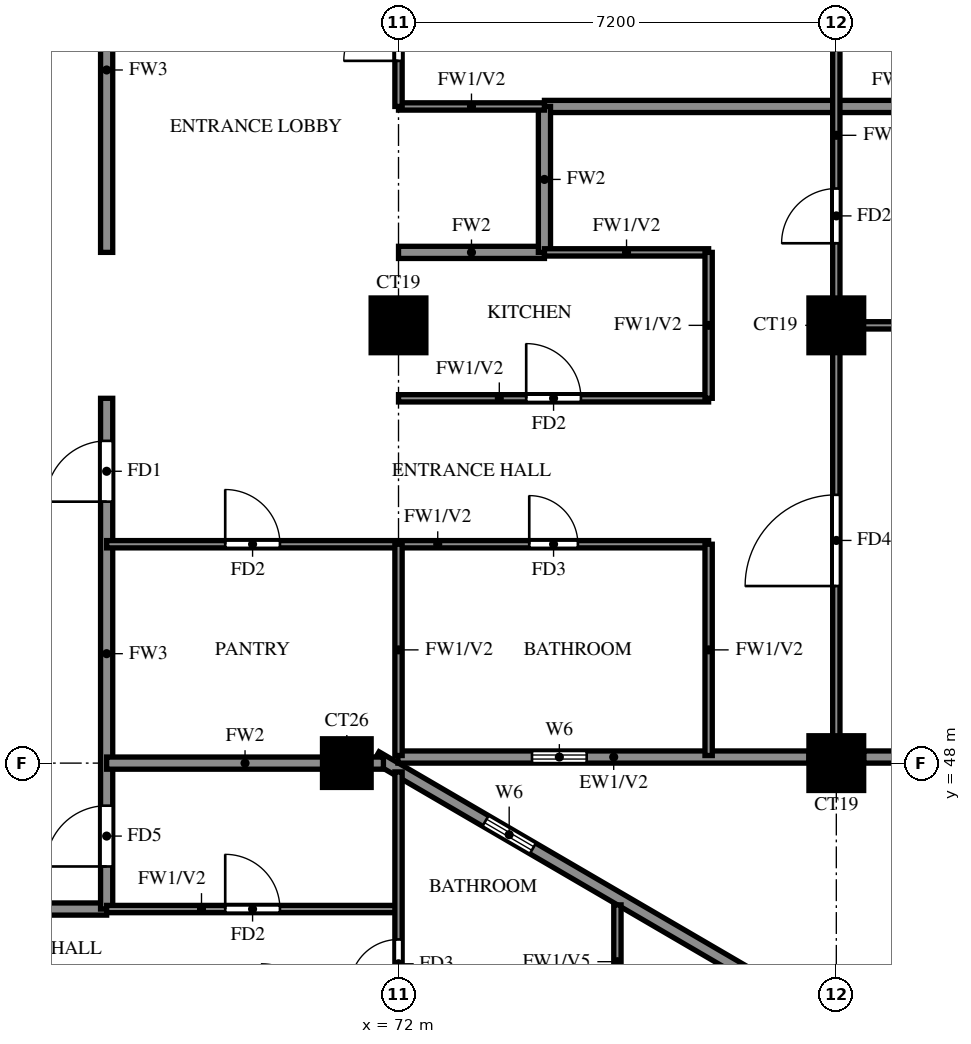
"""IFC4 building model, lengths in metres.
Left out: names, types, materials, properties, quantities, classifications, styles, units other than length and angle.
Written with IfcOpenShell. Run it as: python <this file> out.ifc"""

import sys

from ifc_helpers import new_model, si_unit, direction, frame, frame_2d, origin, origin_2d, place, context, subcontext, project, spatial, rectangle, extrude, source, transform, mapped, element, fill, save


model = new_model("IFC4")
c1 = context("Model", 3, precision=1e-05, world=origin(), true_north=direction((0.0, 1.0)))
c2 = subcontext(c1, "Body", "Model", "MODEL_VIEW")
j1 = project(units=[si_unit("LENGTHUNIT", "METRE"), si_unit("PLANEANGLEUNIT", "RADIAN")], contexts=[c1])
p1 = place(None, origin())
s1 = spatial("IfcSite", under=j1, at=p1, CompositionType="ELEMENT")
p2 = place(p1, origin())
s2 = spatial("IfcBuilding", under=s1, at=p2, CompositionType="ELEMENT")
p3 = place(p2, frame((0.0, 0.0, 181.5)))
s3 = spatial("IfcBuildingStorey", under=s2, at=p3, CompositionType="ELEMENT", Elevation=181.5)
m1 = source(origin(), c2, "Body", "SweptSolid", [
    extrude(rectangle(XDim=0.8, YDim=0.8, at=origin_2d()), origin(), (0.0, 0.0, 1.0), 3.2),
])
p4 = place(p3, frame((71.15, 48.0, 0.0), z_axis=(0.0, 0.0, 1.0), x_axis=(1.0, 0.0, 0.0)))
e1 = element("IfcColumn", 1, at=p4, inside=s3, PredefinedType="COLUMN", context=c2, shape_type="MappedRepresentation", body=[
    mapped(m1, transform((0.0, 0.0, 0.0))),
])
m2 = source(origin(), c2, "Body", "SweptSolid", [
    extrude(rectangle(XDim=0.9, YDim=0.9, at=origin_2d()), origin(), (0.0, 0.0, 1.0), 3.2),
])
for number, where, z_axis, x_axis in (
    (2, (79.2, 48.0, 0.0), (0.0, 0.0, 1.0), (1.0, 0.0, 0.0)),
    (3, (72.0, 55.2, 0.0), (0.0, 0.0, 1.0), (1.0, 0.0, 0.0)),
    (4, (79.2, 55.2, 0.0), (0.0, 0.0, 1.0), (1.0, 0.0, 0.0)),
):
    element("IfcColumn", number, at=place(p3, frame(where, z_axis=z_axis, x_axis=x_axis)), inside=s3, PredefinedType="COLUMN", context=c2, shape_type="MappedRepresentation", body=[
        mapped(m2, transform((0.0, 0.0, 0.0))),
    ])
p5 = place(p3, frame((85.719, 39.881, 0.0), z_axis=(0.0, 0.0, 1.0), x_axis=(-0.86377618652, 0.503875678716, 0.0)))
e5 = element("IfcWall", 5, at=p5, inside=s3, PredefinedType="SOLIDWALL", context=c2, shape_type="SweptSolid", body=[
    extrude(rectangle(XDim=16.311, YDim=0.2, at=frame_2d((8.156, 0.0))), origin(), (0.0, 0.0, 1.0), 3.2),
])
p6 = place(p5, frame((13.326, 0.0, 1.5)))
e6 = element("IfcOpeningElement", 6, at=p6, cuts=e5, PredefinedType="OPENING", context=c2, shape_type="SweptSolid", body=[
    extrude(rectangle(XDim=0.9, YDim=0.9, at=frame_2d((0.45, 0.45))), frame((0.0, 0.11, 0.0), z_axis=(0.0, -1.0, 0.0), x_axis=(1.0, 0.0, 0.0)), (0.0, 0.0, 1.0), 0.22),
])
p7 = place(p3, frame((71.99, 48.1, 0.0), z_axis=(0.0, 0.0, 1.0), x_axis=(1.0, 0.0, 0.0)))
e7 = element("IfcWall", 7, at=p7, inside=s3, PredefinedType="SOLIDWALL", context=c2, shape_type="SweptSolid", body=[
    extrude(rectangle(XDim=6.76, YDim=0.2, at=frame_2d((3.38, 0.0))), origin(), (0.0, 0.0, 1.0), 3.2),
])
p8 = place(p7, frame((2.205, 0.0, 1.5)))
e8 = element("IfcOpeningElement", 8, at=p8, cuts=e7, PredefinedType="OPENING", context=c2, shape_type="SweptSolid", body=[
    extrude(rectangle(XDim=0.9, YDim=0.9, at=frame_2d((0.45, 0.45))), frame((0.0, 0.11, 0.0), z_axis=(0.0, -1.0, 0.0), x_axis=(1.0, 0.0, 0.0)), (0.0, 0.0, 1.0), 0.22),
])
p9 = place(p3, frame((79.65, 48.1, 0.0), z_axis=(0.0, 0.0, 1.0), x_axis=(1.0, 0.0, 0.0)))
e9 = element("IfcWall", 9, at=p9, inside=s3, PredefinedType="SOLIDWALL", context=c2, shape_type="SweptSolid", body=[
    extrude(rectangle(XDim=5.75, YDim=0.2, at=frame_2d((2.875, 0.0))), origin(), (0.0, 0.0, 1.0), 3.2),
])
p10 = place(p9, frame((1.675, 0.0, 0.6)))
e10 = element("IfcOpeningElement", 10, at=p10, cuts=e9, PredefinedType="OPENING", context=c2, shape_type="SweptSolid", body=[
    extrude(rectangle(XDim=2.4, YDim=2.4, at=frame_2d((1.2, 1.2))), frame((0.0, 0.11, 0.0), z_axis=(0.0, -1.0, 0.0), x_axis=(1.0, 0.0, 0.0)), (0.0, 0.0, 1.0), 0.22),
])
p11 = place(p3, frame((60.0, 45.6, 0.0), z_axis=(0.0, 0.0, 1.0), x_axis=(1.0, 0.0, 0.0)))
e11 = element("IfcWall", 11, at=p11, inside=s3, PredefinedType="SOLIDWALL", context=c2, shape_type="SweptSolid", body=[
    extrude(rectangle(XDim=7.2, YDim=0.2, at=frame_2d((3.6, 0.0))), origin(), (0.0, 0.0, 1.0), 3.2),
])
p12 = place(p3, frame((67.2, 45.6, 0.0), z_axis=(0.0, 0.0, 1.0), x_axis=(0.0, 1.0, 0.0)))
e12 = element("IfcWall", 12, at=p12, inside=s3, PredefinedType="SOLIDWALL", context=c2, shape_type="SweptSolid", body=[
    extrude(rectangle(XDim=8.4, YDim=0.2, at=frame_2d((4.2, 0.0))), origin(), (0.0, 0.0, 1.0), 3.2),
])
p13 = place(p12, frame((6.7, 0.0, 0.0)))
e13 = element("IfcOpeningElement", 13, at=p13, cuts=e12, PredefinedType="OPENING", context=c2, shape_type="SweptSolid", body=[
    extrude(rectangle(XDim=1.0, YDim=2.1, at=frame_2d((0.5, 1.05))), frame((0.0, 0.11, 0.0), z_axis=(0.0, -1.0, 0.0), x_axis=(1.0, 0.0, 0.0)), (0.0, 0.0, 1.0), 0.22),
])
p14 = place(p12, frame((0.7, 0.0, 0.0)))
e14 = element("IfcOpeningElement", 14, at=p14, cuts=e12, PredefinedType="OPENING", context=c2, shape_type="SweptSolid", body=[
    extrude(rectangle(XDim=1.0, YDim=2.1, at=frame_2d((0.5, 1.05))), frame((0.0, 0.11, 0.0), z_axis=(0.0, -1.0, 0.0), x_axis=(1.0, 0.0, 0.0)), (0.0, 0.0, 1.0), 0.22),
])
p15 = place(p3, frame((67.2, 56.4, 0.0), z_axis=(0.0, 0.0, 1.0), x_axis=(0.0, 1.0, 0.0)))
e15 = element("IfcWall", 15, at=p15, inside=s3, PredefinedType="SOLIDWALL", context=c2, shape_type="SweptSolid", body=[
    extrude(rectangle(XDim=6.0, YDim=0.2, at=frame_2d((3.0, 0.0))), origin(), (0.0, 0.0, 1.0), 3.2),
])
p16 = place(p15, frame((3.7, 0.0, 0.0)))
e16 = element("IfcOpeningElement", 16, at=p16, cuts=e15, PredefinedType="OPENING", context=c2, shape_type="SweptSolid", body=[
    extrude(rectangle(XDim=1.0, YDim=2.1, at=frame_2d((0.5, 1.05))), frame((0.0, 0.11, 0.0), z_axis=(0.0, -1.0, 0.0), x_axis=(1.0, 0.0, 0.0)), (0.0, 0.0, 1.0), 0.22),
])
p17 = place(p3, frame((67.2, 48.0, 0.0), z_axis=(0.0, 0.0, 1.0), x_axis=(1.0, 0.0, 0.0)))
e17 = element("IfcWall", 17, at=p17, inside=s3, PredefinedType="SOLIDWALL", context=c2, shape_type="SweptSolid", body=[
    extrude(rectangle(XDim=4.552, YDim=0.2, at=frame_2d((2.276, 0.0))), origin(), (0.0, 0.0, 1.0), 3.2),
])
p18 = place(p3, frame((72.0, 56.4, 0.0), z_axis=(0.0, 0.0, 1.0), x_axis=(1.0, 0.0, 0.0)))
e18 = element("IfcWall", 18, at=p18, inside=s3, PredefinedType="SOLIDWALL", context=c2, shape_type="SweptSolid", body=[
    extrude(rectangle(XDim=2.4, YDim=0.2, at=frame_2d((1.2, 0.0))), origin(), (0.0, 0.0, 1.0), 3.2),
])
p19 = place(p3, frame((74.4, 58.8, 0.0), z_axis=(0.0, 0.0, 1.0), x_axis=(1.0, 0.0, 0.0)))
e19 = element("IfcWall", 19, at=p19, inside=s3, PredefinedType="SOLIDWALL", context=c2, shape_type="SweptSolid", body=[
    extrude(rectangle(XDim=11.875, YDim=0.2, at=frame_2d((5.938, 0.0))), origin(), (0.0, 0.0, 1.0), 2.3),
])
p20 = place(p3, frame((74.4, 56.4, 0.0), z_axis=(0.0, 0.0, 1.0), x_axis=(0.0, 1.0, 0.0)))
e20 = element("IfcWall", 20, at=p20, inside=s3, PredefinedType="SOLIDWALL", context=c2, shape_type="SweptSolid", body=[
    extrude(rectangle(XDim=2.4, YDim=0.2, at=frame_2d((1.2, 0.0))), origin(), (0.0, 0.0, 1.0), 3.2),
])
p21 = place(p3, frame((67.2, 45.6, 0.0), z_axis=(0.0, 0.0, 1.0), x_axis=(1.0, 0.0, 0.0)))
e21 = element("IfcWall", 21, at=p21, inside=s3, PredefinedType="PARTITIONING", context=c2, shape_type="SweptSolid", body=[
    extrude(rectangle(XDim=4.8, YDim=0.12, at=frame_2d((2.4, 0.0))), origin(), (0.0, 0.0, 1.0), 3.2),
])
p22 = place(p21, frame((1.95, 0.0, 0.0)))
e22 = element("IfcOpeningElement", 22, at=p22, cuts=e21, PredefinedType="OPENING", context=c2, shape_type="SweptSolid", body=[
    extrude(rectangle(XDim=0.9, YDim=2.1, at=frame_2d((0.45, 1.05))), frame((0.0, 0.07, 0.0), z_axis=(0.0, -1.0, 0.0), x_axis=(1.0, 0.0, 0.0)), (0.0, 0.0, 1.0), 0.14),
])
p23 = place(p3, frame((67.2, 51.6, 0.0), z_axis=(0.0, 0.0, 1.0), x_axis=(1.0, 0.0, 0.0)))
e23 = element("IfcWall", 23, at=p23, inside=s3, PredefinedType="PARTITIONING", context=c2, shape_type="SweptSolid", body=[
    extrude(rectangle(XDim=9.9, YDim=0.12, at=frame_2d((4.95, 0.0))), origin(), (0.0, 0.0, 1.0), 3.2),
])
p24 = place(p23, frame((6.95, 0.0, 0.0)))
e24 = element("IfcOpeningElement", 24, at=p24, cuts=e23, PredefinedType="OPENING", context=c2, shape_type="SweptSolid", body=[
    extrude(rectangle(XDim=0.8, YDim=2.1, at=frame_2d((0.4, 1.05))), frame((0.0, 0.07, 0.0), z_axis=(0.0, -1.0, 0.0), x_axis=(1.0, 0.0, 0.0)), (0.0, 0.0, 1.0), 0.14),
])
p25 = place(p23, frame((1.95, 0.0, 0.0)))
e25 = element("IfcOpeningElement", 25, at=p25, cuts=e23, PredefinedType="OPENING", context=c2, shape_type="SweptSolid", body=[
    extrude(rectangle(XDim=0.9, YDim=2.1, at=frame_2d((0.45, 1.05))), frame((0.0, 0.07, 0.0), z_axis=(0.0, -1.0, 0.0), x_axis=(1.0, 0.0, 0.0)), (0.0, 0.0, 1.0), 0.14),
])
p26 = place(p3, frame((72.0, 54.0, 0.0), z_axis=(0.0, 0.0, 1.0), x_axis=(1.0, 0.0, 0.0)))
e26 = element("IfcWall", 26, at=p26, inside=s3, PredefinedType="PARTITIONING", context=c2, shape_type="SweptSolid", body=[
    extrude(rectangle(XDim=5.1, YDim=0.12, at=frame_2d((2.55, 0.0))), origin(), (0.0, 0.0, 1.0), 3.2),
])
p27 = place(p26, frame((2.1, 0.0, 0.0)))
e27 = element("IfcOpeningElement", 27, at=p27, cuts=e26, PredefinedType="OPENING", context=c2, shape_type="SweptSolid", body=[
    extrude(rectangle(XDim=0.9, YDim=2.1, at=frame_2d((0.45, 1.05))), frame((0.0, 0.07, 0.0), z_axis=(0.0, -1.0, 0.0), x_axis=(1.0, 0.0, 0.0)), (0.0, 0.0, 1.0), 0.14),
])
p28 = place(p3, frame((79.2, 55.2, 0.0), z_axis=(0.0, 0.0, 1.0), x_axis=(1.0, 0.0, 0.0)))
e28 = element("IfcWall", 28, at=p28, inside=s3, PredefinedType="PARTITIONING", context=c2, shape_type="SweptSolid", body=[
    extrude(rectangle(XDim=7.075, YDim=0.12, at=frame_2d((3.538, 0.0))), origin(), (0.0, 0.0, 1.0), 3.2),
])
p29 = place(p3, frame((74.4, 56.4, 0.0), z_axis=(0.0, 0.0, 1.0), x_axis=(1.0, 0.0, 0.0)))
e29 = element("IfcWall", 29, at=p29, inside=s3, PredefinedType="PARTITIONING", context=c2, shape_type="SweptSolid", body=[
    extrude(rectangle(XDim=2.7, YDim=0.12, at=frame_2d((1.35, 0.0))), origin(), (0.0, 0.0, 1.0), 3.2),
])
p30 = place(p3, frame((72.0, 58.8, 0.0), z_axis=(0.0, 0.0, 1.0), x_axis=(1.0, 0.0, 0.0)))
e30 = element("IfcWall", 30, at=p30, inside=s3, PredefinedType="PARTITIONING", context=c2, shape_type="SweptSolid", body=[
    extrude(rectangle(XDim=2.4, YDim=0.12, at=frame_2d((1.2, 0.0))), origin(), (0.0, 0.0, 1.0), 3.2),
])
p31 = place(p3, frame((72.0, 39.725, 0.0), z_axis=(0.0, 0.0, 1.0), x_axis=(0.0, 1.0, 0.0)))
e31 = element("IfcWall", 31, at=p31, inside=s3, PredefinedType="PARTITIONING", context=c2, shape_type="SweptSolid", body=[
    extrude(rectangle(XDim=8.13, YDim=0.12, at=frame_2d((4.065, 0.0))), origin(), (0.0, 0.0, 1.0), 2.3),
])
p32 = place(p31, frame((1.788, 0.0, 0.0)))
e32 = element("IfcOpeningElement", 32, at=p32, cuts=e31, PredefinedType="OPENING", context=c2, shape_type="SweptSolid", body=[
    extrude(rectangle(XDim=0.9, YDim=2.1, at=frame_2d((0.45, 1.05))), frame((0.0, 0.07, 0.0), z_axis=(0.0, -1.0, 0.0), x_axis=(1.0, 0.0, 0.0)), (0.0, 0.0, 1.0), 0.14),
])
p33 = place(p31, frame((4.575, 0.0, 0.0)))
e33 = element("IfcOpeningElement", 33, at=p33, cuts=e31, PredefinedType="OPENING", context=c2, shape_type="SweptSolid", body=[
    extrude(rectangle(XDim=0.8, YDim=2.1, at=frame_2d((0.4, 1.05))), frame((0.0, 0.07, 0.0), z_axis=(0.0, -1.0, 0.0), x_axis=(1.0, 0.0, 0.0)), (0.0, 0.0, 1.0), 0.14),
])
p34 = place(p3, frame((72.0, 48.125, 0.0), z_axis=(0.0, 0.0, 1.0), x_axis=(0.0, 1.0, 0.0)))
e34 = element("IfcWall", 34, at=p34, inside=s3, PredefinedType="PARTITIONING", context=c2, shape_type="SweptSolid", body=[
    extrude(rectangle(XDim=3.475, YDim=0.12, at=frame_2d((1.738, 0.0))), origin(), (0.0, 0.0, 1.0), 3.2),
])
p35 = place(p3, frame((72.0, 58.8, 0.0), z_axis=(0.0, 0.0, 1.0), x_axis=(0.0, 1.0, 0.0)))
e35 = element("IfcWall", 35, at=p35, inside=s3, PredefinedType="PARTITIONING", context=c2, shape_type="SweptSolid", body=[
    extrude(rectangle(XDim=3.6, YDim=0.12, at=frame_2d((1.8, 0.0))), origin(), (0.0, 0.0, 1.0), 3.2),
])
p36 = place(p35, frame((0.75, 0.0, 0.0)))
e36 = element("IfcOpeningElement", 36, at=p36, cuts=e35, PredefinedType="OPENING", context=c2, shape_type="SweptSolid", body=[
    extrude(rectangle(XDim=0.9, YDim=2.1, at=frame_2d((0.45, 1.05))), frame((0.0, 0.07, 0.0), z_axis=(0.0, -1.0, 0.0), x_axis=(1.0, 0.0, 0.0)), (0.0, 0.0, 1.0), 0.14),
])
p37 = place(p3, frame((75.6, 43.8, 0.0), z_axis=(0.0, 0.0, 1.0), x_axis=(0.0, 1.0, 0.0)))
e37 = element("IfcWall", 37, at=p37, inside=s3, PredefinedType="PARTITIONING", context=c2, shape_type="SweptSolid", body=[
    extrude(rectangle(XDim=1.868, YDim=0.12, at=frame_2d((0.934, 0.0))), origin(), (0.0, 0.0, 1.0), 2.3),
])
p38 = place(p3, frame((77.1, 48.125, 0.0), z_axis=(0.0, 0.0, 1.0), x_axis=(0.0, 1.0, 0.0)))
e38 = element("IfcWall", 38, at=p38, inside=s3, PredefinedType="PARTITIONING", context=c2, shape_type="SweptSolid", body=[
    extrude(rectangle(XDim=3.475, YDim=0.12, at=frame_2d((1.738, 0.0))), origin(), (0.0, 0.0, 1.0), 3.2),
])
p39 = place(p3, frame((77.1, 54.0, 0.0), z_axis=(0.0, 0.0, 1.0), x_axis=(0.0, 1.0, 0.0)))
e39 = element("IfcWall", 39, at=p39, inside=s3, PredefinedType="PARTITIONING", context=c2, shape_type="SweptSolid", body=[
    extrude(rectangle(XDim=2.4, YDim=0.12, at=frame_2d((1.2, 0.0))), origin(), (0.0, 0.0, 1.0), 3.2),
])
p40 = place(p3, frame((79.2, 48.125, 0.0), z_axis=(0.0, 0.0, 1.0), x_axis=(0.0, 1.0, 0.0)))
e40 = element("IfcWall", 40, at=p40, inside=s3, PredefinedType="PARTITIONING", context=c2, shape_type="SweptSolid", body=[
    extrude(rectangle(XDim=21.475, YDim=0.12, at=frame_2d((10.738, 0.0))), origin(), (0.0, 0.0, 1.0), 3.2),
])
p41 = place(p40, frame((2.788, 0.0, 0.0)))
e41 = element("IfcOpeningElement", 41, at=p41, cuts=e40, PredefinedType="OPENING", context=c2, shape_type="SweptSolid", body=[
    extrude(rectangle(XDim=1.5, YDim=2.1, at=frame_2d((0.75, 1.05))), frame((0.0, 0.07, 0.0), z_axis=(0.0, -1.0, 0.0), x_axis=(1.0, 0.0, 0.0)), (0.0, 0.0, 1.0), 0.14),
])
p42 = place(p40, frame((8.425, 0.0, 0.0)))
e42 = element("IfcOpeningElement", 42, at=p42, cuts=e40, PredefinedType="OPENING", context=c2, shape_type="SweptSolid", body=[
    extrude(rectangle(XDim=0.9, YDim=2.1, at=frame_2d((0.45, 1.05))), frame((0.0, 0.07, 0.0), z_axis=(0.0, -1.0, 0.0), x_axis=(1.0, 0.0, 0.0)), (0.0, 0.0, 1.0), 0.14),
])
p43 = place(p40, frame((12.025, 0.0, 0.0)))
e43 = element("IfcOpeningElement", 43, at=p43, cuts=e40, PredefinedType="OPENING", context=c2, shape_type="SweptSolid", body=[
    extrude(rectangle(XDim=0.9, YDim=2.1, at=frame_2d((0.45, 1.05))), frame((0.0, 0.07, 0.0), z_axis=(0.0, -1.0, 0.0), x_axis=(1.0, 0.0, 0.0)), (0.0, 0.0, 1.0), 0.14),
])
p44 = place(p40, frame((17.425, 0.0, 0.0)))
e44 = element("IfcOpeningElement", 44, at=p44, cuts=e40, PredefinedType="OPENING", context=c2, shape_type="SweptSolid", body=[
    extrude(rectangle(XDim=0.9, YDim=2.1, at=frame_2d((0.45, 1.05))), frame((0.0, 0.07, 0.0), z_axis=(0.0, -1.0, 0.0), x_axis=(1.0, 0.0, 0.0)), (0.0, 0.0, 1.0), 0.14),
])
p45 = place(p6, origin())
e45 = element("IfcWindow", 45, at=p45, inside=s3, PartitioningType="SINGLE_PANEL", PredefinedType="WINDOW", context=c2, shape_type="SweptSolid", body=[
    extrude(rectangle(XDim=0.9, YDim=0.9, at=frame_2d((0.45, 0.45))), frame((0.0, 0.03, 0.0), z_axis=(0.0, -1.0, 0.0), x_axis=(1.0, 0.0, 0.0)), (0.0, 0.0, 1.0), 0.06),
])
fill(e6, e45)
p46 = place(p8, origin())
e46 = element("IfcWindow", 46, at=p46, inside=s3, PartitioningType="SINGLE_PANEL", PredefinedType="WINDOW", context=c2, shape_type="SweptSolid", body=[
    extrude(rectangle(XDim=0.9, YDim=0.9, at=frame_2d((0.45, 0.45))), frame((0.0, 0.03, 0.0), z_axis=(0.0, -1.0, 0.0), x_axis=(1.0, 0.0, 0.0)), (0.0, 0.0, 1.0), 0.06),
])
fill(e8, e46)
p47 = place(p13, origin())
e47 = element("IfcDoor", 47, at=p47, inside=s3, OperationType="SINGLE_SWING_LEFT", PredefinedType="DOOR", context=c2, shape_type="SweptSolid", body=[
    extrude(rectangle(XDim=1.0, YDim=2.1, at=frame_2d((0.5, 1.05))), frame((0.0, 0.025, 0.0), z_axis=(0.0, -1.0, 0.0), x_axis=(1.0, 0.0, 0.0)), (0.0, 0.0, 1.0), 0.05),
])
fill(e13, e47)
p48 = place(p41, origin())
e48 = element("IfcDoor", 48, at=p48, inside=s3, OperationType="SINGLE_SWING_LEFT", PredefinedType="DOOR", context=c2, shape_type="SweptSolid", body=[
    extrude(rectangle(XDim=1.5, YDim=2.1, at=frame_2d((0.75, 1.05))), frame((0.0, 0.025, 0.0), z_axis=(0.0, -1.0, 0.0), x_axis=(1.0, 0.0, 0.0)), (0.0, 0.0, 1.0), 0.05),
])
fill(e41, e48)
p49 = place(p42, origin())
e49 = element("IfcDoor", 49, at=p49, inside=s3, OperationType="SINGLE_SWING_RIGHT", PredefinedType="DOOR", context=c2, shape_type="SweptSolid", body=[
    extrude(rectangle(XDim=0.9, YDim=2.1, at=frame_2d((0.45, 1.05))), frame((0.0, 0.025, 0.0), z_axis=(0.0, -1.0, 0.0), x_axis=(1.0, 0.0, 0.0)), (0.0, 0.0, 1.0), 0.05),
])
fill(e42, e49)
p50 = place(p24, origin())
e50 = element("IfcDoor", 50, at=p50, inside=s3, OperationType="SINGLE_SWING_LEFT", PredefinedType="DOOR", context=c2, shape_type="SweptSolid", body=[
    extrude(rectangle(XDim=0.8, YDim=2.1, at=frame_2d((0.4, 1.05))), frame((0.0, 0.025, 0.0), z_axis=(0.0, -1.0, 0.0), x_axis=(1.0, 0.0, 0.0)), (0.0, 0.0, 1.0), 0.05),
])
fill(e24, e50)
p51 = place(p27, origin())
e51 = element("IfcDoor", 51, at=p51, inside=s3, OperationType="SINGLE_SWING_LEFT", PredefinedType="DOOR", context=c2, shape_type="SweptSolid", body=[
    extrude(rectangle(XDim=0.9, YDim=2.1, at=frame_2d((0.45, 1.05))), frame((0.0, 0.025, 0.0), z_axis=(0.0, -1.0, 0.0), x_axis=(1.0, 0.0, 0.0)), (0.0, 0.0, 1.0), 0.05),
])
fill(e27, e51)
p52 = place(p25, origin())
e52 = element("IfcDoor", 52, at=p52, inside=s3, OperationType="SINGLE_SWING_RIGHT", PredefinedType="DOOR", context=c2, shape_type="SweptSolid", body=[
    extrude(rectangle(XDim=0.9, YDim=2.1, at=frame_2d((0.45, 1.05))), frame((0.0, 0.025, 0.0), z_axis=(0.0, -1.0, 0.0), x_axis=(1.0, 0.0, 0.0)), (0.0, 0.0, 1.0), 0.05),
])
fill(e25, e52)
p53 = place(p36, origin())
e53 = element("IfcDoor", 53, at=p53, inside=s3, OperationType="SINGLE_SWING_LEFT", PredefinedType="DOOR", context=c2, shape_type="SweptSolid", body=[
    extrude(rectangle(XDim=0.9, YDim=2.1, at=frame_2d((0.45, 1.05))), frame((0.0, 0.025, 0.0), z_axis=(0.0, -1.0, 0.0), x_axis=(1.0, 0.0, 0.0)), (0.0, 0.0, 1.0), 0.05),
])
fill(e36, e53)
p54 = place(p22, origin())
e54 = element("IfcDoor", 54, at=p54, inside=s3, OperationType="SINGLE_SWING_RIGHT", PredefinedType="DOOR", context=c2, shape_type="SweptSolid", body=[
    extrude(rectangle(XDim=0.9, YDim=2.1, at=frame_2d((0.45, 1.05))), frame((0.0, 0.025, 0.0), z_axis=(0.0, -1.0, 0.0), x_axis=(1.0, 0.0, 0.0)), (0.0, 0.0, 1.0), 0.05),
])
fill(e22, e54)
p55 = place(p14, origin())
e55 = element("IfcDoor", 55, at=p55, inside=s3, OperationType="SINGLE_SWING_LEFT", PredefinedType="DOOR", context=c2, shape_type="SweptSolid", body=[
    extrude(rectangle(XDim=1.0, YDim=2.1, at=frame_2d((0.5, 1.05))), frame((0.0, 0.025, 0.0), z_axis=(0.0, -1.0, 0.0), x_axis=(1.0, 0.0, 0.0)), (0.0, 0.0, 1.0), 0.05),
])
fill(e14, e55)
p56 = place(p33, origin())
e56 = element("IfcDoor", 56, at=p56, inside=s3, OperationType="SINGLE_SWING_LEFT", PredefinedType="DOOR", context=c2, shape_type="SweptSolid", body=[
    extrude(rectangle(XDim=0.8, YDim=2.1, at=frame_2d((0.4, 1.05))), frame((0.0, 0.025, 0.0), z_axis=(0.0, -1.0, 0.0), x_axis=(1.0, 0.0, 0.0)), (0.0, 0.0, 1.0), 0.05),
])
fill(e33, e56)
save(model, sys.argv[1])
